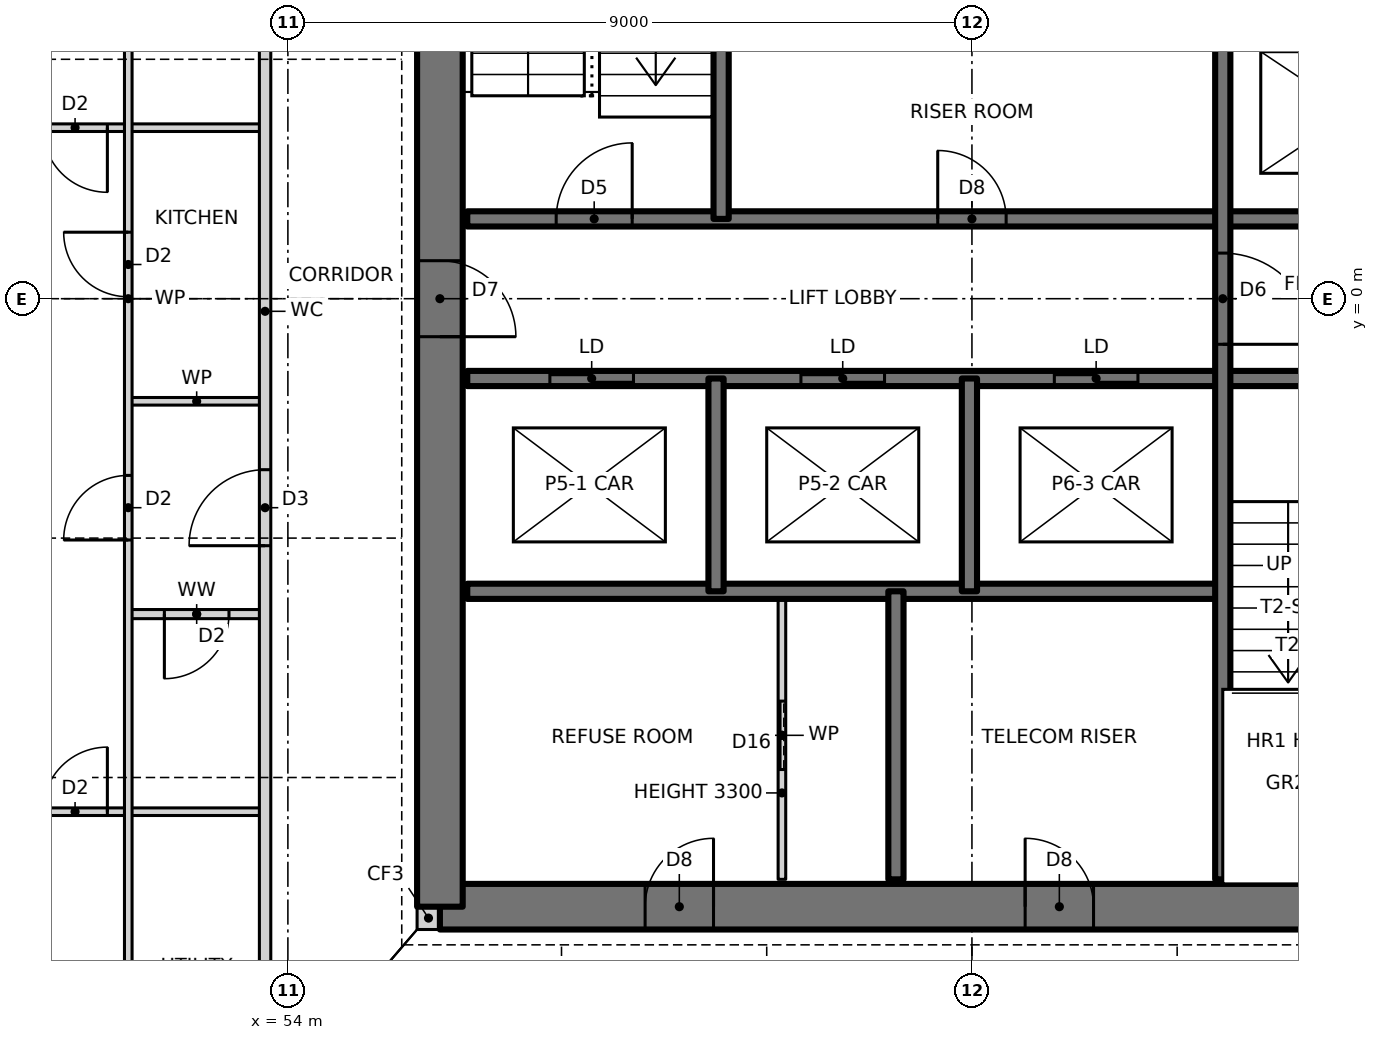
"""IFC4 building model, lengths in metres.
Left out: names, types, materials, properties, quantities, classifications, styles, units other than length and angle.
Written with IfcOpenShell. Run it as: python <this file> out.ifc"""

import sys

from ifc_helpers import new_model, si_unit, direction, frame, frame_2d, origin, place, context, subcontext, project, spatial, rectangle, extrude, element, fill, save


model = new_model("IFC4")
c1 = context("Model", 3, precision=1e-05, world=origin(), true_north=direction((0.0, 1.0)))
c2 = subcontext(c1, "Body", "Model", "MODEL_VIEW")
j1 = project(units=[si_unit("LENGTHUNIT", "METRE"), si_unit("PLANEANGLEUNIT", "RADIAN")], contexts=[c1])
p1 = place(None, origin())
s1 = spatial("IfcSite", under=j1, at=p1, CompositionType="ELEMENT")
p2 = place(p1, origin())
s2 = spatial("IfcBuilding", under=s1, at=p2, CompositionType="ELEMENT")
p3 = place(p2, frame((0.0, 0.0, 18.5)))
s3 = spatial("IfcBuildingStorey", under=s2, at=p3, CompositionType="ELEMENT", Elevation=18.5)
p4 = place(p3, frame((55.7, -8.15, 0.0), z_axis=(0.0, 0.0, 1.0), x_axis=(1.0, 0.0, 0.0)))
e1 = element("IfcWall", 1, at=p4, inside=s3, PredefinedType="SOLIDWALL", context=c2, shape_type="SweptSolid", body=[
    extrude(rectangle(XDim=0.3, YDim=0.3, at=frame_2d((0.15, 0.0))), origin(), (0.0, 0.0, 1.0), 3.5),
])
p5 = place(p3, frame((56.0, -8.0, 0.0), z_axis=(0.0, 0.0, 1.0), x_axis=(1.0, 0.0, 0.0)))
e2 = element("IfcWall", 2, at=p5, inside=s3, PredefinedType="SHEAR", context=c2, shape_type="SweptSolid", body=[
    extrude(rectangle(XDim=14.0, YDim=0.6, at=frame_2d((7.0, 0.0))), origin(), (0.0, 0.0, 1.0), 3.5),
])
p6 = place(p5, frame((2.7, 0.0, 0.0)))
e3 = element("IfcOpeningElement", 3, at=p6, cuts=e2, PredefinedType="OPENING", context=c2, shape_type="SweptSolid", body=[
    extrude(rectangle(XDim=0.9, YDim=2.1, at=frame_2d((0.45, 1.05))), frame((0.0, 0.31, 0.0), z_axis=(0.0, -1.0, 0.0), x_axis=(1.0, 0.0, 0.0)), (0.0, 0.0, 1.0), 0.62),
])
p7 = place(p5, frame((7.7, 0.0, 0.0)))
e4 = element("IfcOpeningElement", 4, at=p7, cuts=e2, PredefinedType="OPENING", context=c2, shape_type="SweptSolid", body=[
    extrude(rectangle(XDim=0.9, YDim=2.1, at=frame_2d((0.45, 1.05))), frame((0.0, 0.31, 0.0), z_axis=(0.0, -1.0, 0.0), x_axis=(1.0, 0.0, 0.0)), (0.0, 0.0, 1.0), 0.62),
])
p8 = place(p3, frame((56.0, 8.0, 0.0), z_axis=(0.0, 0.0, 1.0), x_axis=(0.0, -1.0, 0.0)))
e5 = element("IfcWall", 5, at=p8, inside=s3, PredefinedType="SHEAR", context=c2, shape_type="SweptSolid", body=[
    extrude(rectangle(XDim=16.0, YDim=0.6, at=frame_2d((8.0, 0.0))), origin(), (0.0, 0.0, 1.0), 3.5),
])
p9 = place(p8, frame((7.5, 0.0, 0.0)))
e6 = element("IfcOpeningElement", 6, at=p9, cuts=e5, PredefinedType="OPENING", context=c2, shape_type="SweptSolid", body=[
    extrude(rectangle(XDim=1.0, YDim=2.1, at=frame_2d((0.5, 1.05))), frame((0.0, 0.31, 0.0), z_axis=(0.0, -1.0, 0.0), x_axis=(1.0, 0.0, 0.0)), (0.0, 0.0, 1.0), 0.62),
])
p10 = place(p3, frame((46.56, -6.75, 0.0), z_axis=(0.0, 0.0, 1.0), x_axis=(1.0, 0.0, 0.0)))
e7 = element("IfcWall", 7, at=p10, inside=s3, PredefinedType="PARTITIONING", context=c2, shape_type="SweptSolid", body=[
    extrude(rectangle(XDim=7.14, YDim=0.1, at=frame_2d((3.57, 0.0))), origin(), (0.0, 0.0, 1.0), 3.27),
])
p11 = place(p10, frame((4.215, 0.0, 0.0)))
e8 = element("IfcOpeningElement", 8, at=p11, cuts=e7, PredefinedType="OPENING", context=c2, shape_type="SweptSolid", body=[
    extrude(rectangle(XDim=0.85, YDim=2.1, at=frame_2d((0.425, 1.05))), frame((0.0, 0.06, 0.0), z_axis=(0.0, -1.0, 0.0), x_axis=(1.0, 0.0, 0.0)), (0.0, 0.0, 1.0), 0.12),
])
p12 = place(p3, frame((51.9, -4.15, 0.0), z_axis=(0.0, 0.0, 1.0), x_axis=(1.0, 0.0, 0.0)))
e9 = element("IfcWall", 9, at=p12, inside=s3, PredefinedType="PARTITIONING", context=c2, shape_type="SweptSolid", body=[
    extrude(rectangle(XDim=1.8, YDim=0.12, at=frame_2d((0.9, 0.0))), origin(), (0.0, 0.0, 1.0), 3.27),
])
p13 = place(p12, frame((0.475, 0.0, 0.0)))
e10 = element("IfcOpeningElement", 10, at=p13, cuts=e9, PredefinedType="OPENING", context=c2, shape_type="SweptSolid", body=[
    extrude(rectangle(XDim=0.85, YDim=2.1, at=frame_2d((0.425, 1.05))), frame((0.0, 0.07, 0.0), z_axis=(0.0, -1.0, 0.0), x_axis=(1.0, 0.0, 0.0)), (0.0, 0.0, 1.0), 0.14),
])
p14 = place(p3, frame((56.36, -3.85, 0.0), z_axis=(0.0, 0.0, 1.0), x_axis=(1.0, 0.0, 0.0)))
e11 = element("IfcWall", 11, at=p14, inside=s3, PredefinedType="SOLIDWALL", context=c2, shape_type="SweptSolid", body=[
    extrude(rectangle(XDim=9.94, YDim=0.2, at=frame_2d((4.97, 0.0))), origin(), (0.0, 0.0, 1.0), 3.5),
])
p15 = place(p3, frame((51.9, -1.35, 0.0), z_axis=(0.0, 0.0, 1.0), x_axis=(1.0, 0.0, 0.0)))
e12 = element("IfcWall", 12, at=p15, inside=s3, PredefinedType="PARTITIONING", context=c2, shape_type="SweptSolid", body=[
    extrude(rectangle(XDim=1.8, YDim=0.1, at=frame_2d((0.9, 0.0))), origin(), (0.0, 0.0, 1.0), 3.27),
])
p16 = place(p3, frame((56.36, -1.05, 0.0), z_axis=(0.0, 0.0, 1.0), x_axis=(1.0, 0.0, 0.0)))
e13 = element("IfcWall", 13, at=p16, inside=s3, PredefinedType="SOLIDWALL", context=c2, shape_type="SweptSolid", body=[
    extrude(rectangle(XDim=13.28, YDim=0.2, at=frame_2d((6.64, 0.0))), origin(), (0.0, 0.0, 1.0), 3.5),
])
p17 = place(p16, frame((11.11, 0.0, 0.0)))
e14 = element("IfcOpeningElement", 14, at=p17, cuts=e13, PredefinedType="OPENING", context=c2, shape_type="SweptSolid", body=[
    extrude(rectangle(XDim=1.0, YDim=2.1, at=frame_2d((0.5, 1.05))), frame((0.0, 0.11, 0.0), z_axis=(0.0, -1.0, 0.0), x_axis=(1.0, 0.0, 0.0)), (0.0, 0.0, 1.0), 0.22),
])
p18 = place(p16, frame((1.087, 0.0, 0.0)))
e15 = element("IfcOpeningElement", 15, at=p18, cuts=e13, PredefinedType="OPENING", context=c2, shape_type="SweptSolid", body=[
    extrude(rectangle(XDim=1.1, YDim=2.1, at=frame_2d((0.55, 1.05))), frame((0.0, 0.11, 0.0), z_axis=(0.0, -1.0, 0.0), x_axis=(1.0, 0.0, 0.0)), (0.0, 0.0, 1.0), 0.22),
])
p19 = place(p16, frame((4.39, 0.0, 0.0)))
e16 = element("IfcOpeningElement", 16, at=p19, cuts=e13, PredefinedType="OPENING", context=c2, shape_type="SweptSolid", body=[
    extrude(rectangle(XDim=1.1, YDim=2.1, at=frame_2d((0.55, 1.05))), frame((0.0, 0.11, 0.0), z_axis=(0.0, -1.0, 0.0), x_axis=(1.0, 0.0, 0.0)), (0.0, 0.0, 1.0), 0.22),
])
p20 = place(p16, frame((7.724, 0.0, 0.0)))
e17 = element("IfcOpeningElement", 17, at=p20, cuts=e13, PredefinedType="OPENING", context=c2, shape_type="SweptSolid", body=[
    extrude(rectangle(XDim=1.1, YDim=2.1, at=frame_2d((0.55, 1.05))), frame((0.0, 0.11, 0.0), z_axis=(0.0, -1.0, 0.0), x_axis=(1.0, 0.0, 0.0)), (0.0, 0.0, 1.0), 0.22),
])
p21 = place(p3, frame((56.36, 1.05, 0.0), z_axis=(0.0, 0.0, 1.0), x_axis=(1.0, 0.0, 0.0)))
e18 = element("IfcWall", 18, at=p21, inside=s3, PredefinedType="SOLIDWALL", context=c2, shape_type="SweptSolid", body=[
    extrude(rectangle(XDim=13.28, YDim=0.2, at=frame_2d((6.64, 0.0))), origin(), (0.0, 0.0, 1.0), 3.5),
])
p22 = place(p21, frame((1.17, 0.0, 0.0)))
e19 = element("IfcOpeningElement", 19, at=p22, cuts=e18, PredefinedType="OPENING", context=c2, shape_type="SweptSolid", body=[
    extrude(rectangle(XDim=1.0, YDim=2.1, at=frame_2d((0.5, 1.05))), frame((0.0, 0.11, 0.0), z_axis=(0.0, -1.0, 0.0), x_axis=(1.0, 0.0, 0.0)), (0.0, 0.0, 1.0), 0.22),
])
p23 = place(p21, frame((6.19, 0.0, 0.0)))
e20 = element("IfcOpeningElement", 20, at=p23, cuts=e18, PredefinedType="OPENING", context=c2, shape_type="SweptSolid", body=[
    extrude(rectangle(XDim=0.9, YDim=2.1, at=frame_2d((0.45, 1.05))), frame((0.0, 0.11, 0.0), z_axis=(0.0, -1.0, 0.0), x_axis=(1.0, 0.0, 0.0)), (0.0, 0.0, 1.0), 0.22),
])
p24 = place(p21, frame((10.96, 0.0, 0.0)))
e21 = element("IfcOpeningElement", 21, at=p24, cuts=e18, PredefinedType="OPENING", context=c2, shape_type="SweptSolid", body=[
    extrude(rectangle(XDim=1.3, YDim=2.1, at=frame_2d((0.65, 1.05))), frame((0.0, 0.11, 0.0), z_axis=(0.0, -1.0, 0.0), x_axis=(1.0, 0.0, 0.0)), (0.0, 0.0, 1.0), 0.22),
])
p25 = place(p3, frame((46.56, 2.25, 0.0), z_axis=(0.0, 0.0, 1.0), x_axis=(1.0, 0.0, 0.0)))
e22 = element("IfcWall", 22, at=p25, inside=s3, PredefinedType="PARTITIONING", context=c2, shape_type="SweptSolid", body=[
    extrude(rectangle(XDim=7.14, YDim=0.1, at=frame_2d((3.57, 0.0))), origin(), (0.0, 0.0, 1.0), 3.27),
])
p26 = place(p25, frame((4.215, 0.0, 0.0)))
e23 = element("IfcOpeningElement", 23, at=p26, cuts=e22, PredefinedType="OPENING", context=c2, shape_type="SweptSolid", body=[
    extrude(rectangle(XDim=0.85, YDim=2.1, at=frame_2d((0.425, 1.05))), frame((0.0, 0.06, 0.0), z_axis=(0.0, -1.0, 0.0), x_axis=(1.0, 0.0, 0.0)), (0.0, 0.0, 1.0), 0.12),
])
p27 = place(p3, frame((66.3, -7.64, 0.0), z_axis=(0.0, 0.0, 1.0), x_axis=(0.0, 1.0, 0.0)))
e24 = element("IfcWall", 24, at=p27, inside=s3, PredefinedType="SOLIDWALL", context=c2, shape_type="SweptSolid", body=[
    extrude(rectangle(XDim=11.49, YDim=0.2, at=frame_2d((5.745, 0.0))), origin(), (0.0, 0.0, 1.0), 3.5),
])
p28 = place(p27, frame((7.04, 0.0, 0.0)))
e25 = element("IfcOpeningElement", 25, at=p28, cuts=e24, PredefinedType="OPENING", context=c2, shape_type="SweptSolid", body=[
    extrude(rectangle(XDim=1.2, YDim=2.1, at=frame_2d((0.6, 1.05))), frame((0.0, 0.11, 0.0), z_axis=(0.0, -1.0, 0.0), x_axis=(1.0, 0.0, 0.0)), (0.0, 0.0, 1.0), 0.22),
])
p29 = place(p3, frame((62.967, -3.85, 0.0), z_axis=(0.0, 0.0, 1.0), x_axis=(0.0, 1.0, 0.0)))
e26 = element("IfcWall", 26, at=p29, inside=s3, PredefinedType="SOLIDWALL", context=c2, shape_type="SweptSolid", body=[
    extrude(rectangle(XDim=2.8, YDim=0.2, at=frame_2d((1.4, 0.0))), origin(), (0.0, 0.0, 1.0), 3.5),
])
p30 = place(p3, frame((62.0, -7.64, 0.0), z_axis=(0.0, 0.0, 1.0), x_axis=(0.0, 1.0, 0.0)))
e27 = element("IfcWall", 27, at=p30, inside=s3, PredefinedType="SOLIDWALL", context=c2, shape_type="SweptSolid", body=[
    extrude(rectangle(XDim=3.79, YDim=0.2, at=frame_2d((1.895, 0.0))), origin(), (0.0, 0.0, 1.0), 3.5),
])
p31 = place(p3, frame((60.5, -7.64, 0.0), z_axis=(0.0, 0.0, 1.0), x_axis=(0.0, 1.0, 0.0)))
e28 = element("IfcWall", 28, at=p31, inside=s3, PredefinedType="PARTITIONING", context=c2, shape_type="SweptSolid", body=[
    extrude(rectangle(XDim=3.79, YDim=0.1, at=frame_2d((1.895, 0.0))), origin(), (0.0, 0.0, 1.0), 3.3),
])
p32 = place(p31, frame((1.445, 0.0, 0.0)))
e29 = element("IfcOpeningElement", 29, at=p32, cuts=e28, PredefinedType="OPENING", context=c2, shape_type="SweptSolid", body=[
    extrude(rectangle(XDim=0.9, YDim=2.1, at=frame_2d((0.45, 1.05))), frame((0.0, 0.06, 0.0), z_axis=(0.0, -1.0, 0.0), x_axis=(1.0, 0.0, 0.0)), (0.0, 0.0, 1.0), 0.12),
])
p33 = place(p3, frame((59.7, 1.05, 0.0), z_axis=(0.0, 0.0, 1.0), x_axis=(0.0, 1.0, 0.0)))
e30 = element("IfcWall", 30, at=p33, inside=s3, PredefinedType="SOLIDWALL", context=c2, shape_type="SweptSolid", body=[
    extrude(rectangle(XDim=6.59, YDim=0.2, at=frame_2d((3.295, 0.0))), origin(), (0.0, 0.0, 1.0), 3.5),
])
p34 = place(p3, frame((59.633, -3.85, 0.0), z_axis=(0.0, 0.0, 1.0), x_axis=(0.0, 1.0, 0.0)))
e31 = element("IfcWall", 31, at=p34, inside=s3, PredefinedType="SOLIDWALL", context=c2, shape_type="SweptSolid", body=[
    extrude(rectangle(XDim=2.8, YDim=0.2, at=frame_2d((1.4, 0.0))), origin(), (0.0, 0.0, 1.0), 3.5),
])
p35 = place(p3, frame((53.7, -10.9, 0.0), z_axis=(0.0, 0.0, 1.0), x_axis=(0.0, 1.0, 0.0)))
e32 = element("IfcWall", 32, at=p35, inside=s3, PredefinedType="PARTITIONING", context=c2, shape_type="SweptSolid", body=[
    extrude(rectangle(XDim=21.468, YDim=0.15, at=frame_2d((10.734, 0.0))), origin(), (0.0, 0.0, 1.0), 3.27),
])
p36 = place(p35, frame((7.65, 0.0, 0.0)))
e33 = element("IfcOpeningElement", 33, at=p36, cuts=e32, PredefinedType="OPENING", context=c2, shape_type="SweptSolid", body=[
    extrude(rectangle(XDim=1.0, YDim=2.1, at=frame_2d((0.5, 1.05))), frame((0.0, 0.085, 0.0), z_axis=(0.0, -1.0, 0.0), x_axis=(1.0, 0.0, 0.0)), (0.0, 0.0, 1.0), 0.17),
])
p37 = place(p3, frame((51.9, -12.614, 0.0), z_axis=(0.0, 0.0, 1.0), x_axis=(0.0, 1.0, 0.0)))
e34 = element("IfcWall", 34, at=p37, inside=s3, PredefinedType="PARTITIONING", context=c2, shape_type="SweptSolid", body=[
    extrude(rectangle(XDim=25.228, YDim=0.1, at=frame_2d((12.614, 0.0))), origin(), (0.0, 0.0, 1.0), 3.27),
])
p38 = place(p37, frame((12.639, 0.0, 0.0)))
e35 = element("IfcOpeningElement", 35, at=p38, cuts=e34, PredefinedType="OPENING", context=c2, shape_type="SweptSolid", body=[
    extrude(rectangle(XDim=0.85, YDim=2.1, at=frame_2d((0.425, 1.05))), frame((0.0, 0.06, 0.0), z_axis=(0.0, -1.0, 0.0), x_axis=(1.0, 0.0, 0.0)), (0.0, 0.0, 1.0), 0.12),
])
p39 = place(p37, frame((9.439, 0.0, 0.0)))
e36 = element("IfcOpeningElement", 36, at=p39, cuts=e34, PredefinedType="OPENING", context=c2, shape_type="SweptSolid", body=[
    extrude(rectangle(XDim=0.85, YDim=2.1, at=frame_2d((0.425, 1.05))), frame((0.0, 0.06, 0.0), z_axis=(0.0, -1.0, 0.0), x_axis=(1.0, 0.0, 0.0)), (0.0, 0.0, 1.0), 0.12),
])
p40 = place(p37, frame((16.639, 0.0, 0.0)))
e37 = element("IfcOpeningElement", 37, at=p40, cuts=e34, PredefinedType="OPENING", context=c2, shape_type="SweptSolid", body=[
    extrude(rectangle(XDim=0.85, YDim=2.1, at=frame_2d((0.425, 1.05))), frame((0.0, 0.06, 0.0), z_axis=(0.0, -1.0, 0.0), x_axis=(1.0, 0.0, 0.0)), (0.0, 0.0, 1.0), 0.12),
])
p41 = place(p37, frame((21.821, 0.0, 0.0)))
e38 = element("IfcOpeningElement", 38, at=p41, cuts=e34, PredefinedType="OPENING", context=c2, shape_type="SweptSolid", body=[
    extrude(rectangle(XDim=0.85, YDim=2.1, at=frame_2d((0.425, 1.05))), frame((0.0, 0.06, 0.0), z_axis=(0.0, -1.0, 0.0), x_axis=(1.0, 0.0, 0.0)), (0.0, 0.0, 1.0), 0.12),
])
p42 = place(p37, frame((2.507, 0.0, 0.0)))
e39 = element("IfcOpeningElement", 39, at=p42, cuts=e34, PredefinedType="OPENING", context=c2, shape_type="SweptSolid", body=[
    extrude(rectangle(XDim=0.85, YDim=2.1, at=frame_2d((0.425, 1.05))), frame((0.0, 0.06, 0.0), z_axis=(0.0, -1.0, 0.0), x_axis=(1.0, 0.0, 0.0)), (0.0, 0.0, 1.0), 0.12),
])
p43 = place(p22, origin())
e40 = element("IfcDoor", 40, at=p43, inside=s3, OperationType="SINGLE_SWING_RIGHT", PredefinedType="DOOR", context=c2, shape_type="SweptSolid", body=[
    extrude(rectangle(XDim=1.0, YDim=2.1, at=frame_2d((0.5, 1.05))), frame((0.0, 0.025, 0.0), z_axis=(0.0, -1.0, 0.0), x_axis=(1.0, 0.0, 0.0)), (0.0, 0.0, 1.0), 0.05),
])
fill(e19, e40)
p44 = place(p28, frame((1.2, 0.0, 0.0), z_axis=(0.0, 0.0, 1.0), x_axis=(-1.0, 0.0, 0.0)))
e41 = element("IfcDoor", 41, at=p44, inside=s3, OperationType="SINGLE_SWING_RIGHT", PredefinedType="DOOR", context=c2, shape_type="SweptSolid", body=[
    extrude(rectangle(XDim=1.2, YDim=2.1, at=frame_2d((0.6, 1.05))), frame((0.0, 0.025, 0.0), z_axis=(0.0, -1.0, 0.0), x_axis=(1.0, 0.0, 0.0)), (0.0, 0.0, 1.0), 0.05),
])
fill(e25, e41)
p45 = place(p23, origin())
e42 = element("IfcDoor", 42, at=p45, inside=s3, OperationType="SINGLE_SWING_LEFT", PredefinedType="DOOR", context=c2, shape_type="SweptSolid", body=[
    extrude(rectangle(XDim=0.9, YDim=2.1, at=frame_2d((0.45, 1.05))), frame((0.0, 0.025, 0.0), z_axis=(0.0, -1.0, 0.0), x_axis=(1.0, 0.0, 0.0)), (0.0, 0.0, 1.0), 0.05),
])
fill(e20, e42)
p46 = place(p32, origin())
e43 = element("IfcDoor", 43, at=p46, inside=s3, OperationType="SLIDING_TO_LEFT", PredefinedType="DOOR", context=c2, shape_type="SweptSolid", body=[
    extrude(rectangle(XDim=0.9, YDim=2.1, at=frame_2d((0.45, 1.05))), frame((0.0, 0.025, 0.0), z_axis=(0.0, -1.0, 0.0), x_axis=(1.0, 0.0, 0.0)), (0.0, 0.0, 1.0), 0.05),
])
fill(e29, e43)
p47 = place(p38, origin())
e44 = element("IfcDoor", 44, at=p47, inside=s3, OperationType="SINGLE_SWING_RIGHT", PredefinedType="DOOR", context=c2, shape_type="SweptSolid", body=[
    extrude(rectangle(XDim=0.85, YDim=2.1, at=frame_2d((0.425, 1.05))), frame((0.0, 0.025, 0.0), z_axis=(0.0, -1.0, 0.0), x_axis=(1.0, 0.0, 0.0)), (0.0, 0.0, 1.0), 0.05),
])
fill(e35, e44)
p48 = place(p36, origin())
e45 = element("IfcDoor", 45, at=p48, inside=s3, OperationType="SINGLE_SWING_LEFT", PredefinedType="DOOR", context=c2, shape_type="SweptSolid", body=[
    extrude(rectangle(XDim=1.0, YDim=2.1, at=frame_2d((0.5, 1.05))), frame((0.0, 0.025, 0.0), z_axis=(0.0, -1.0, 0.0), x_axis=(1.0, 0.0, 0.0)), (0.0, 0.0, 1.0), 0.05),
])
fill(e33, e45)
p49 = place(p39, origin())
e46 = element("IfcDoor", 46, at=p49, inside=s3, OperationType="SINGLE_SWING_LEFT", PredefinedType="DOOR", context=c2, shape_type="SweptSolid", body=[
    extrude(rectangle(XDim=0.85, YDim=2.1, at=frame_2d((0.425, 1.05))), frame((0.0, 0.025, 0.0), z_axis=(0.0, -1.0, 0.0), x_axis=(1.0, 0.0, 0.0)), (0.0, 0.0, 1.0), 0.05),
])
fill(e36, e46)
p50 = place(p13, frame((0.85, 0.0, 0.0), z_axis=(0.0, 0.0, 1.0), x_axis=(-1.0, 0.0, 0.0)))
e47 = element("IfcDoor", 47, at=p50, inside=s3, OperationType="SINGLE_SWING_RIGHT", PredefinedType="DOOR", context=c2, shape_type="SweptSolid", body=[
    extrude(rectangle(XDim=0.85, YDim=2.1, at=frame_2d((0.425, 1.05))), frame((0.0, 0.025, 0.0), z_axis=(0.0, -1.0, 0.0), x_axis=(1.0, 0.0, 0.0)), (0.0, 0.0, 1.0), 0.05),
])
fill(e10, e47)
p51 = place(p26, frame((0.85, 0.0, 0.0), z_axis=(0.0, 0.0, 1.0), x_axis=(-1.0, 0.0, 0.0)))
e48 = element("IfcDoor", 48, at=p51, inside=s3, OperationType="SINGLE_SWING_LEFT", PredefinedType="DOOR", context=c2, shape_type="SweptSolid", body=[
    extrude(rectangle(XDim=0.85, YDim=2.1, at=frame_2d((0.425, 1.05))), frame((0.0, 0.025, 0.0), z_axis=(0.0, -1.0, 0.0), x_axis=(1.0, 0.0, 0.0)), (0.0, 0.0, 1.0), 0.05),
])
fill(e23, e48)
p52 = place(p11, origin())
e49 = element("IfcDoor", 49, at=p52, inside=s3, OperationType="SINGLE_SWING_RIGHT", PredefinedType="DOOR", context=c2, shape_type="SweptSolid", body=[
    extrude(rectangle(XDim=0.85, YDim=2.1, at=frame_2d((0.425, 1.05))), frame((0.0, 0.025, 0.0), z_axis=(0.0, -1.0, 0.0), x_axis=(1.0, 0.0, 0.0)), (0.0, 0.0, 1.0), 0.05),
])
fill(e8, e49)
p53 = place(p9, origin())
e50 = element("IfcDoor", 50, at=p53, inside=s3, OperationType="SINGLE_SWING_RIGHT", PredefinedType="DOOR", context=c2, shape_type="SweptSolid", body=[
    extrude(rectangle(XDim=1.0, YDim=2.1, at=frame_2d((0.5, 1.05))), frame((0.0, 0.025, 0.0), z_axis=(0.0, -1.0, 0.0), x_axis=(1.0, 0.0, 0.0)), (0.0, 0.0, 1.0), 0.05),
])
fill(e6, e50)
p54 = place(p6, origin())
e51 = element("IfcDoor", 51, at=p54, inside=s3, OperationType="SINGLE_SWING_RIGHT", PredefinedType="DOOR", context=c2, shape_type="SweptSolid", body=[
    extrude(rectangle(XDim=0.9, YDim=2.1, at=frame_2d((0.45, 1.05))), frame((0.0, 0.025, 0.0), z_axis=(0.0, -1.0, 0.0), x_axis=(1.0, 0.0, 0.0)), (0.0, 0.0, 1.0), 0.05),
])
fill(e3, e51)
p55 = place(p7, origin())
e52 = element("IfcDoor", 52, at=p55, inside=s3, OperationType="SINGLE_SWING_LEFT", PredefinedType="DOOR", context=c2, shape_type="SweptSolid", body=[
    extrude(rectangle(XDim=0.9, YDim=2.1, at=frame_2d((0.45, 1.05))), frame((0.0, 0.025, 0.0), z_axis=(0.0, -1.0, 0.0), x_axis=(1.0, 0.0, 0.0)), (0.0, 0.0, 1.0), 0.05),
])
fill(e4, e52)
p56 = place(p18, origin())
e53 = element("IfcDoor", 53, at=p56, inside=s3, OperationType="DOUBLE_DOOR_SLIDING", PredefinedType="DOOR", context=c2, shape_type="SweptSolid", body=[
    extrude(rectangle(XDim=1.1, YDim=2.1, at=frame_2d((0.55, 1.05))), frame((0.0, 0.025, 0.0), z_axis=(0.0, -1.0, 0.0), x_axis=(1.0, 0.0, 0.0)), (0.0, 0.0, 1.0), 0.05),
])
fill(e15, e53)
p57 = place(p19, origin())
e54 = element("IfcDoor", 54, at=p57, inside=s3, OperationType="DOUBLE_DOOR_SLIDING", PredefinedType="DOOR", context=c2, shape_type="SweptSolid", body=[
    extrude(rectangle(XDim=1.1, YDim=2.1, at=frame_2d((0.55, 1.05))), frame((0.0, 0.025, 0.0), z_axis=(0.0, -1.0, 0.0), x_axis=(1.0, 0.0, 0.0)), (0.0, 0.0, 1.0), 0.05),
])
fill(e16, e54)
p58 = place(p20, origin())
e55 = element("IfcDoor", 55, at=p58, inside=s3, OperationType="DOUBLE_DOOR_SLIDING", PredefinedType="DOOR", context=c2, shape_type="SweptSolid", body=[
    extrude(rectangle(XDim=1.1, YDim=2.1, at=frame_2d((0.55, 1.05))), frame((0.0, 0.025, 0.0), z_axis=(0.0, -1.0, 0.0), x_axis=(1.0, 0.0, 0.0)), (0.0, 0.0, 1.0), 0.05),
])
fill(e17, e55)
save(model, sys.argv[1])
